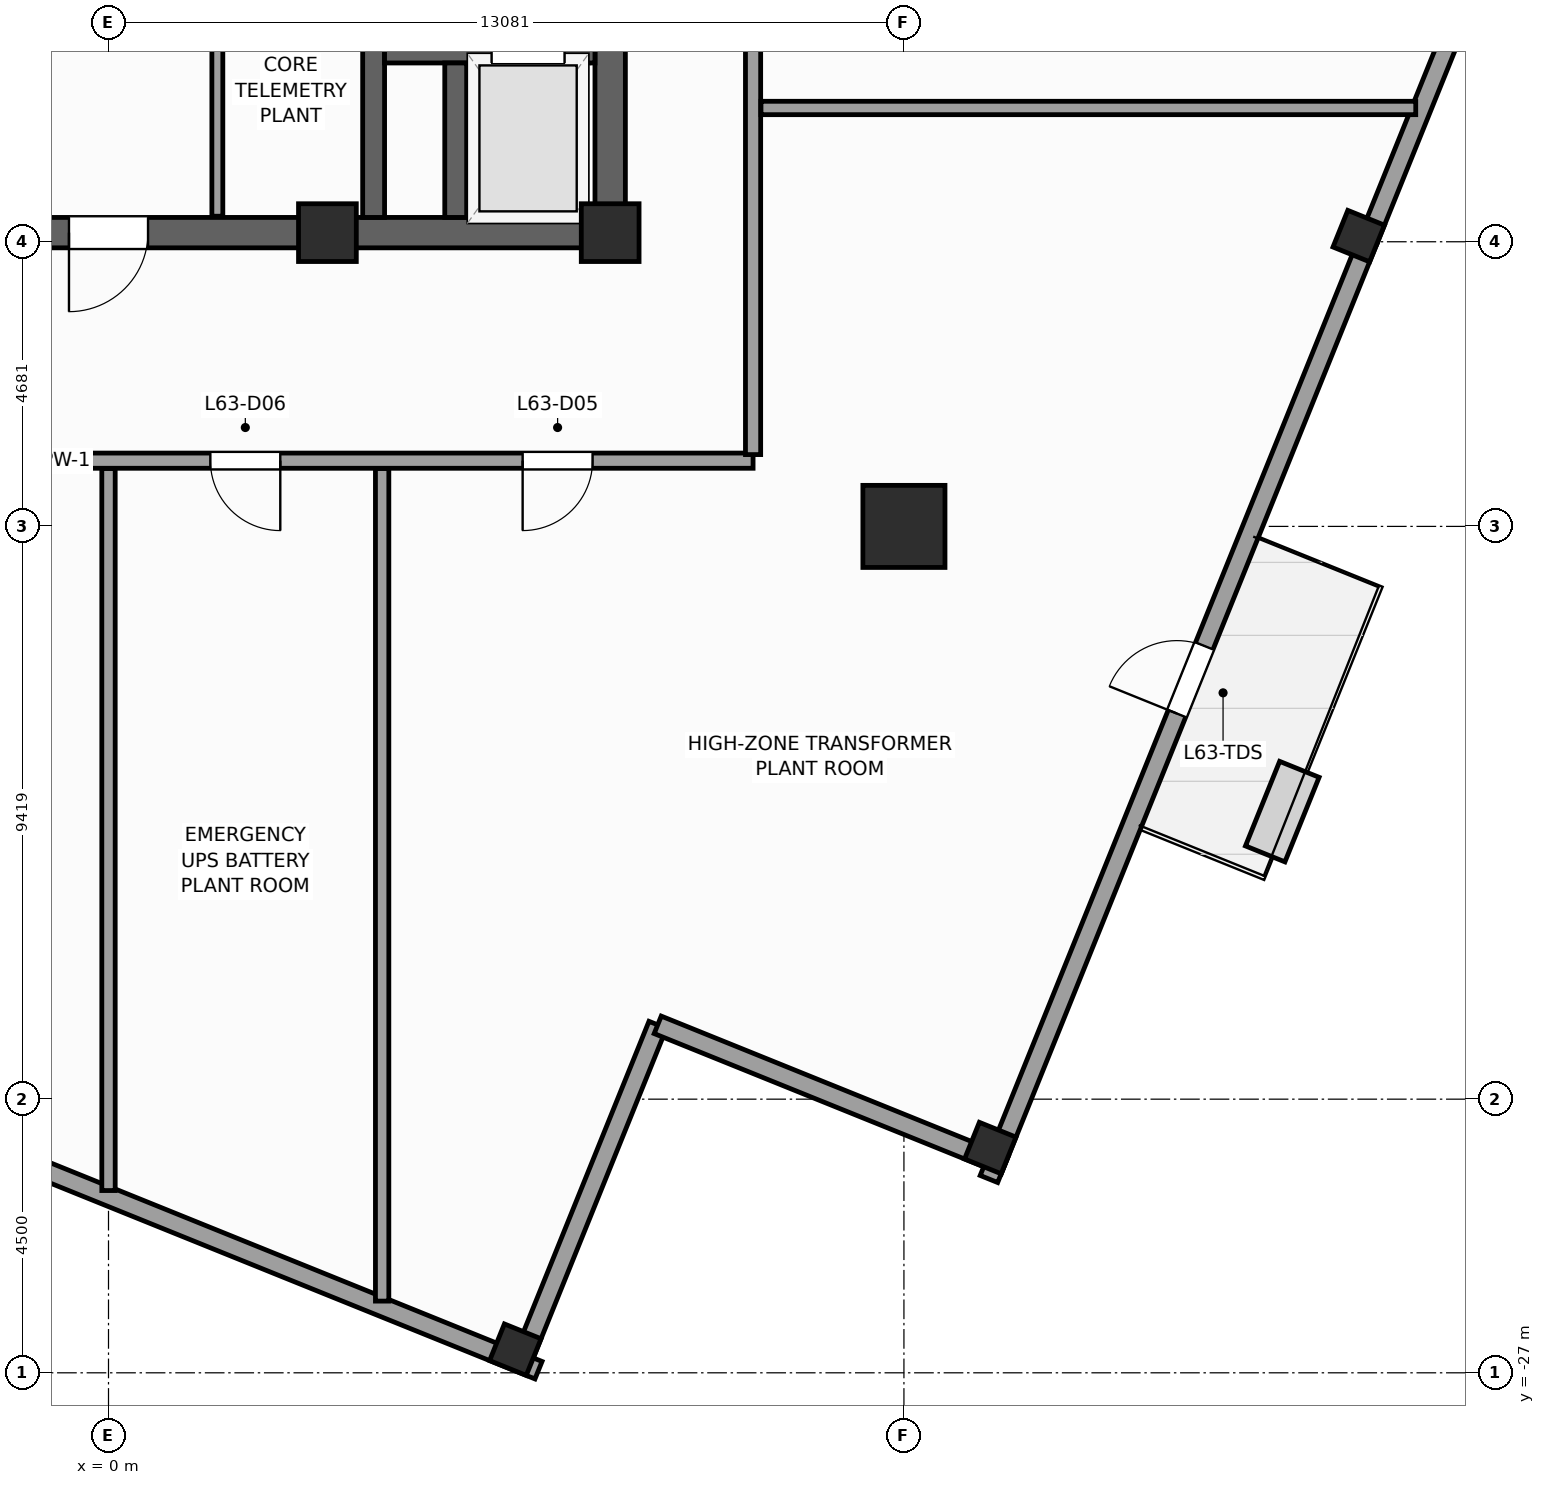
"""IFC4 building model, lengths in metres.
Left out: names, types, materials, properties, quantities, classifications, styles, units other than length and angle.
Written with IfcOpenShell. Run it as: python <this file> out.ifc"""

import sys

from ifc_helpers import new_model, si_unit, direction, frame, frame_2d, origin, origin_2d, place, context, subcontext, project, spatial, rectangle, extrude, source, transform, mapped, element, fill, save


model = new_model("IFC4")
c1 = context("Model", 3, precision=1e-05, world=origin(), true_north=direction((0.0, 1.0)))
c2 = subcontext(c1, "Body", "Model", "MODEL_VIEW")
j1 = project(units=[si_unit("LENGTHUNIT", "METRE"), si_unit("PLANEANGLEUNIT", "RADIAN")], contexts=[c1])
p1 = place(None, origin())
s1 = spatial("IfcSite", under=j1, at=p1, CompositionType="ELEMENT")
p2 = place(p1, origin())
s2 = spatial("IfcBuilding", under=s1, at=p2, CompositionType="ELEMENT")
p3 = place(p2, frame((0.0, 0.0, 260.2)))
s3 = spatial("IfcBuildingStorey", under=s2, at=p3, CompositionType="ELEMENT", Elevation=260.2)
p4 = place(p3, frame((-8.5, -8.25, 0.0), z_axis=(0.0, 0.0, 1.0), x_axis=(1.0, 0.0, 0.0)))
e1 = element("IfcWall", 1, at=p4, inside=s3, PredefinedType="SHEAR", context=c2, shape_type="SweptSolid", body=[
    extrude(rectangle(XDim=17.0, YDim=0.5, at=frame_2d((8.5, 0.0))), origin(), (0.0, 0.0, 1.0), 5.0),
])
p5 = place(p4, frame((7.85, 0.0, 0.0)))
e2 = element("IfcOpeningElement", 2, at=p5, cuts=e1, PredefinedType="OPENING", context=c2, shape_type="SweptSolid", body=[
    extrude(rectangle(XDim=1.3, YDim=2.2, at=frame_2d((0.65, 1.1))), frame((0.0, 0.26, 0.0), z_axis=(0.0, -1.0, 0.0), x_axis=(1.0, 0.0, 0.0)), (0.0, 0.0, 1.0), 0.52),
])
p6 = place(p3, frame((8.25, -8.0, 0.0), z_axis=(0.0, 0.0, 1.0), x_axis=(0.0, 1.0, 0.0)))
e3 = element("IfcWall", 3, at=p6, inside=s3, PredefinedType="SHEAR", context=c2, shape_type="SweptSolid", body=[
    extrude(rectangle(XDim=16.0, YDim=0.5, at=frame_2d((8.0, 0.0))), origin(), (0.0, 0.0, 1.0), 5.0),
])
p7 = place(p6, frame((4.69, 0.0, 0.0)))
e4 = element("IfcOpeningElement", 4, at=p7, cuts=e3, PredefinedType="OPENING", context=c2, shape_type="SweptSolid", body=[
    extrude(rectangle(XDim=1.3, YDim=2.2, at=frame_2d((0.65, 1.1))), frame((0.0, 0.26, 0.0), z_axis=(0.0, -1.0, 0.0), x_axis=(1.0, 0.0, 0.0)), (0.0, 0.0, 1.0), 0.52),
])
p8 = place(p3, frame((4.36, -8.0, 0.0), z_axis=(0.0, 0.0, 1.0), x_axis=(0.0, 1.0, 0.0)))
e5 = element("IfcWall", 5, at=p8, inside=s3, PredefinedType="SHEAR", context=c2, shape_type="SweptSolid", body=[
    extrude(rectangle(XDim=16.0, YDim=0.36, at=frame_2d((8.0, 0.0))), origin(), (0.0, 0.0, 1.0), 5.0),
])
p9 = place(p3, frame((4.54, -5.28, 0.0), z_axis=(0.0, 0.0, 1.0), x_axis=(1.0, 0.0, 0.0)))
e6 = element("IfcWall", 6, at=p9, inside=s3, PredefinedType="SHEAR", context=c2, shape_type="SweptSolid", body=[
    extrude(rectangle(XDim=3.46, YDim=0.36, at=frame_2d((1.73, 0.0))), origin(), (0.0, 0.0, 1.0), 5.0),
])
p10 = place(p9, frame((1.76, 0.0, 0.0)))
e7 = element("IfcOpeningElement", 7, at=p10, cuts=e6, PredefinedType="OPENING", context=c2, shape_type="SweptSolid", body=[
    extrude(rectangle(XDim=1.2, YDim=2.25, at=frame_2d((0.6, 1.125))), frame((0.0, 0.19, 0.0), z_axis=(0.0, -1.0, 0.0), x_axis=(1.0, 0.0, 0.0)), (0.0, 0.0, 1.0), 0.38),
])
p11 = place(p3, frame((5.71, -8.0, 0.0), z_axis=(0.0, 0.0, 1.0), x_axis=(0.0, 1.0, 0.0)))
e8 = element("IfcWall", 8, at=p11, inside=s3, PredefinedType="SHEAR", context=c2, shape_type="SweptSolid", body=[
    extrude(rectangle(XDim=2.54, YDim=0.36, at=frame_2d((1.27, 0.0))), origin(), (0.0, 0.0, 1.0), 5.0),
])
m1 = source(origin(), c2, "Body", "SweptSolid", [
    extrude(rectangle(XDim=0.95, YDim=0.95, at=origin_2d()), origin(), (0.0, 0.0, 1.0), 5.0),
])
for number, where, z_axis, x_axis in (
    (9, (8.25, -8.25, 0.0), (0.0, 0.0, 1.0), (1.0, 0.0, 0.0)),
    (10, (3.6, -8.25, 0.0), (0.0, 0.0, 1.0), (1.0, 0.0, 0.0)),
):
    element("IfcColumn", number, at=place(p3, frame(where, z_axis=z_axis, x_axis=x_axis)), inside=s3, PredefinedType="PILASTER", context=c2, shape_type="MappedRepresentation", body=[
        mapped(m1, transform((0.0, 0.0, 0.0), scale=1.0)),
    ])
m2 = source(origin(), c2, "Body", "SweptSolid", [
    extrude(rectangle(XDim=1.35, YDim=1.35, at=origin_2d()), origin(), (0.0, 0.0, 1.0), 5.0),
])
p12 = place(p3, frame((13.081, -13.081, 0.0), z_axis=(0.0, 0.0, 1.0), x_axis=(1.0, 0.0, 0.0)))
e11 = element("IfcColumn", 11, at=p12, inside=s3, PredefinedType="COLUMN", context=c2, shape_type="MappedRepresentation", body=[
    mapped(m2, transform((0.0, 0.0, 0.0), scale=1.0)),
])
m3 = source(origin(), c2, "Body", "SweptSolid", [
    extrude(rectangle(XDim=0.65, YDim=0.65, at=origin_2d()), origin(), (0.0, 0.0, 1.0), 5.0),
])
for number, where, z_axis, x_axis in (
    (12, (14.501, -23.304, 0.0), (0.0, 0.0, 1.0), (0.375, 0.927, 0.0)),
    (13, (20.56, -8.307, 0.0), (0.0, 0.0, 1.0), (0.375, 0.927, 0.0)),
    (14, (6.69, -26.62, 0.0), (0.0, 0.0, 1.0), (0.375, 0.927, 0.0)),
):
    element("IfcColumn", number, at=place(p3, frame(where, z_axis=z_axis, x_axis=x_axis)), inside=s3, PredefinedType="COLUMN", context=c2, shape_type="MappedRepresentation", body=[
        mapped(m3, transform((0.0, 0.0, 0.0), scale=1.0)),
    ])
p13 = place(p3, frame((6.784, -26.841, 0.0), z_axis=(0.0, 0.0, 1.0), x_axis=(0.374636620962, 0.927171722085, 0.0)))
e15 = element("IfcWall", 15, at=p13, inside=s3, PredefinedType="STANDARD", context=c2, shape_type="SweptSolid", body=[
    extrude(rectangle(XDim=6.0, YDim=0.31, at=frame_2d((3.0, 0.0))), origin(), (0.0, 0.0, 1.0), 4.05),
])
p14 = place(p3, frame((9.032, -21.278, 0.0), z_axis=(0.0, 0.0, 1.0), x_axis=(0.927185411764, -0.374602739196, 0.0)))
e16 = element("IfcWall", 16, at=p14, inside=s3, PredefinedType="STANDARD", context=c2, shape_type="SweptSolid", body=[
    extrude(rectangle(XDim=6.155, YDim=0.31, at=frame_2d((3.078, 0.0))), origin(), (0.0, 0.0, 1.0), 4.75),
])
p15 = place(p3, frame((14.479, -23.813, 0.0), z_axis=(0.0, 0.0, 1.0), x_axis=(0.374618403537, 0.927179082881, 0.0)))
e17 = element("IfcWall", 17, at=p15, inside=s3, PredefinedType="STANDARD", context=c2, shape_type="SweptSolid", body=[
    extrude(rectangle(XDim=16.655, YDim=0.31, at=frame_2d((8.328, 0.0))), origin(), (0.0, 0.0, 1.0), 4.15),
])
p16 = place(p15, frame((8.255, 0.0, 0.0)))
e18 = element("IfcOpeningElement", 18, at=p16, cuts=e17, PredefinedType="OPENING", context=c2, shape_type="SweptSolid", body=[
    extrude(rectangle(XDim=1.2, YDim=2.3, at=frame_2d((0.6, 1.15))), frame((0.0, 0.165, 0.0), z_axis=(0.0, -1.0, 0.0), x_axis=(1.0, 0.0, 0.0)), (0.0, 0.0, 1.0), 0.33),
])
p17 = place(p3, frame((20.718, -8.371, 0.0), z_axis=(0.0, 0.0, 1.0), x_axis=(0.374600710538, 0.927186231382, 0.0)))
e19 = element("IfcWall", 19, at=p17, inside=s3, PredefinedType="STANDARD", context=c2, shape_type="SweptSolid", body=[
    extrude(rectangle(XDim=16.655, YDim=0.31, at=frame_2d((8.328, 0.0))), origin(), (0.0, 0.0, 1.0), 4.15),
])
p18 = place(p17, frame((6.495, 0.0, 0.65)))
e20 = element("IfcOpeningElement", 20, at=p18, cuts=e19, PredefinedType="OPENING", context=c2, shape_type="SweptSolid", body=[
    extrude(rectangle(XDim=2.0, YDim=1.45, at=frame_2d((1.0, 0.725))), frame((0.0, 0.165, 0.0), z_axis=(0.0, -1.0, 0.0), x_axis=(1.0, 0.0, 0.0)), (0.0, 0.0, 1.0), 0.33),
])
p19 = place(p3, frame((-9.298, -20.343, 0.0), z_axis=(0.0, 0.0, 1.0), x_axis=(0.927183654967, -0.374607087443, 0.0)))
e21 = element("IfcWall", 21, at=p19, inside=s3, PredefinedType="STANDARD", context=c2, shape_type="SweptSolid", body=[
    extrude(rectangle(XDim=17.655, YDim=0.31, at=frame_2d((8.828, 0.0))), origin(), (0.0, 0.0, 1.0), 4.15),
])
p20 = place(p19, frame((6.945, 0.0, 0.65)))
e22 = element("IfcOpeningElement", 22, at=p20, cuts=e21, PredefinedType="OPENING", context=c2, shape_type="SweptSolid", body=[
    extrude(rectangle(XDim=2.0, YDim=1.45, at=frame_2d((1.0, 0.725))), frame((0.0, 0.165, 0.0), z_axis=(0.0, -1.0, 0.0), x_axis=(1.0, 0.0, 0.0)), (0.0, 0.0, 1.0), 0.33),
])
p21 = place(p3, frame((1.79, -7.98, 0.0), z_axis=(0.0, 0.0, 1.0), x_axis=(0.0, 1.0, 0.0)))
e23 = element("IfcWall", 23, at=p21, inside=s3, PredefinedType="PARTITIONING", context=c2, shape_type="SweptSolid", body=[
    extrude(rectangle(XDim=12.38, YDim=0.18, at=frame_2d((6.19, 0.0))), origin(), (0.0, 0.0, 1.0), 4.75),
])
p22 = place(p21, frame((8.8, 0.0, 0.0)))
e24 = element("IfcOpeningElement", 24, at=p22, cuts=e23, PredefinedType="OPENING", context=c2, shape_type="SweptSolid", body=[
    extrude(rectangle(XDim=1.1, YDim=2.2, at=frame_2d((0.55, 1.1))), frame((0.0, 0.1, 0.0), z_axis=(0.0, -1.0, 0.0), x_axis=(1.0, 0.0, 0.0)), (0.0, 0.0, 1.0), 0.2),
])
p23 = place(p21, frame((10.86, 0.0, 0.0)))
e25 = element("IfcOpeningElement", 25, at=p23, cuts=e23, PredefinedType="OPENING", context=c2, shape_type="SweptSolid", body=[
    extrude(rectangle(XDim=1.1, YDim=2.2, at=frame_2d((0.55, 1.1))), frame((0.0, 0.1, 0.0), z_axis=(0.0, -1.0, 0.0), x_axis=(1.0, 0.0, 0.0)), (0.0, 0.0, 1.0), 0.2),
])
p24 = place(p21, frame((3.5, 0.0, 0.0)))
e26 = element("IfcOpeningElement", 26, at=p24, cuts=e23, PredefinedType="OPENING", context=c2, shape_type="SweptSolid", body=[
    extrude(rectangle(XDim=1.15, YDim=2.25, at=frame_2d((0.575, 1.125))), frame((0.0, 0.1, 0.0), z_axis=(0.0, -1.0, 0.0), x_axis=(1.0, 0.0, 0.0)), (0.0, 0.0, 1.0), 0.2),
])
p25 = place(p3, frame((-12.0, -12.0, 0.0), z_axis=(0.0, 0.0, 1.0), x_axis=(1.0, 0.0, 0.0)))
e27 = element("IfcWall", 27, at=p25, inside=s3, PredefinedType="PARTITIONING", context=c2, shape_type="SweptSolid", body=[
    extrude(rectangle(XDim=22.6, YDim=0.25, at=frame_2d((11.3, 0.0))), origin(), (0.0, 0.0, 1.0), 4.75),
])
p26 = place(p25, frame((18.811, 0.0, 0.0)))
e28 = element("IfcOpeningElement", 28, at=p26, cuts=e27, PredefinedType="OPENING", context=c2, shape_type="SweptSolid", body=[
    extrude(rectangle(XDim=1.15, YDim=2.25, at=frame_2d((0.575, 1.125))), frame((0.0, 0.135, 0.0), z_axis=(0.0, -1.0, 0.0), x_axis=(1.0, 0.0, 0.0)), (0.0, 0.0, 1.0), 0.27),
])
p27 = place(p25, frame((13.675, 0.0, 0.0)))
e29 = element("IfcOpeningElement", 29, at=p27, cuts=e27, PredefinedType="OPENING", context=c2, shape_type="SweptSolid", body=[
    extrude(rectangle(XDim=1.15, YDim=2.25, at=frame_2d((0.575, 1.125))), frame((0.0, 0.135, 0.0), z_axis=(0.0, -1.0, 0.0), x_axis=(1.0, 0.0, 0.0)), (0.0, 0.0, 1.0), 0.27),
])
p28 = place(p25, frame((8.925, 0.0, 0.0)))
e30 = element("IfcOpeningElement", 30, at=p28, cuts=e27, PredefinedType="OPENING", context=c2, shape_type="SweptSolid", body=[
    extrude(rectangle(XDim=1.15, YDim=2.25, at=frame_2d((0.575, 1.125))), frame((0.0, 0.135, 0.0), z_axis=(0.0, -1.0, 0.0), x_axis=(1.0, 0.0, 0.0)), (0.0, 0.0, 1.0), 0.27),
])
p29 = place(p25, frame((3.089, 0.0, 0.0)))
e31 = element("IfcOpeningElement", 31, at=p29, cuts=e27, PredefinedType="OPENING", context=c2, shape_type="SweptSolid", body=[
    extrude(rectangle(XDim=1.15, YDim=2.25, at=frame_2d((0.575, 1.125))), frame((0.0, 0.135, 0.0), z_axis=(0.0, -1.0, 0.0), x_axis=(1.0, 0.0, 0.0)), (0.0, 0.0, 1.0), 0.27),
])
p30 = place(p3, frame((10.6, -11.9, 0.0), z_axis=(0.0, 0.0, 1.0), x_axis=(0.0, 1.0, 0.0)))
e32 = element("IfcWall", 32, at=p30, inside=s3, PredefinedType="PARTITIONING", context=c2, shape_type="SweptSolid", body=[
    extrude(rectangle(XDim=23.8, YDim=0.25, at=frame_2d((11.9, 0.0))), origin(), (0.0, 0.0, 1.0), 4.75),
])
p31 = place(p30, frame((20.21, 0.0, 0.0)))
e33 = element("IfcOpeningElement", 33, at=p31, cuts=e32, PredefinedType="OPENING", context=c2, shape_type="SweptSolid", body=[
    extrude(rectangle(XDim=1.15, YDim=2.25, at=frame_2d((0.575, 1.125))), frame((0.0, 0.135, 0.0), z_axis=(0.0, -1.0, 0.0), x_axis=(1.0, 0.0, 0.0)), (0.0, 0.0, 1.0), 0.27),
])
p32 = place(p30, frame((11.325, 0.0, 0.0)))
e34 = element("IfcOpeningElement", 34, at=p32, cuts=e32, PredefinedType="OPENING", context=c2, shape_type="SweptSolid", body=[
    extrude(rectangle(XDim=1.15, YDim=2.25, at=frame_2d((0.575, 1.125))), frame((0.0, 0.135, 0.0), z_axis=(0.0, -1.0, 0.0), x_axis=(1.0, 0.0, 0.0)), (0.0, 0.0, 1.0), 0.27),
])
p33 = place(p3, frame((10.73, -6.2, 0.0), z_axis=(0.0, 0.0, 1.0), x_axis=(1.0, 0.0, 0.0)))
e35 = element("IfcWall", 35, at=p33, inside=s3, PredefinedType="PARTITIONING", context=c2, shape_type="SweptSolid", body=[
    extrude(rectangle(XDim=10.768, YDim=0.22, at=frame_2d((5.384, 0.0))), origin(), (0.0, 0.0, 1.0), 4.75),
])
p34 = place(p3, frame((4.5, -12.13, 0.0), z_axis=(0.0, 0.0, 1.0), x_axis=(0.0, -1.0, 0.0)))
e36 = element("IfcWall", 36, at=p34, inside=s3, PredefinedType="PARTITIONING", context=c2, shape_type="SweptSolid", body=[
    extrude(rectangle(XDim=13.691, YDim=0.22, at=frame_2d((6.845, 0.0))), origin(), (0.0, 0.0, 1.0), 4.75),
])
p35 = place(p3, frame((0.0, -12.13, 0.0), z_axis=(0.0, 0.0, 1.0), x_axis=(0.0, -1.0, 0.0)))
e37 = element("IfcWall", 37, at=p35, inside=s3, PredefinedType="PARTITIONING", context=c2, shape_type="SweptSolid", body=[
    extrude(rectangle(XDim=11.873, YDim=0.22, at=frame_2d((5.937, 0.0))), origin(), (0.0, 0.0, 1.0), 4.42),
])
m4 = source(origin(), c2, "Body", "SweptSolid", [
    extrude(rectangle(XDim=1.2, YDim=2.3, at=frame_2d((0.6, 1.15))), frame((0.0, 0.025, 0.0), z_axis=(0.0, -1.0, 0.0), x_axis=(1.0, 0.0, 0.0)), (0.0, 0.0, 1.0), 0.05),
])
p36 = place(p16, origin())
e38 = element("IfcDoor", 38, at=p36, inside=s3, OperationType="SINGLE_SWING_LEFT", PredefinedType="DOOR", context=c2, shape_type="MappedRepresentation", body=[
    mapped(m4, transform((0.0, 0.0, 0.0), scale=1.0)),
])
fill(e18, e38)
m5 = source(origin(), c2, "Body", "SweptSolid", [
    extrude(rectangle(XDim=1.3, YDim=2.2, at=frame_2d((0.65, 1.1))), frame((0.0, 0.025, 0.0), z_axis=(0.0, -1.0, 0.0), x_axis=(1.0, 0.0, 0.0)), (0.0, 0.0, 1.0), 0.05),
])
p37 = place(p5, frame((1.3, 0.0, 0.0), z_axis=(0.0, 0.0, 1.0), x_axis=(-1.0, 0.0, 0.0)))
e39 = element("IfcDoor", 39, at=p37, inside=s3, OperationType="SINGLE_SWING_LEFT", PredefinedType="DOOR", context=c2, shape_type="MappedRepresentation", body=[
    mapped(m5, transform((0.0, 0.0, 0.0), scale=1.0)),
])
fill(e2, e39)
m6 = source(origin(), c2, "Body", "SweptSolid", [
    extrude(rectangle(XDim=1.2, YDim=2.25, at=frame_2d((0.6, 1.125))), frame((0.0, 0.025, 0.0), z_axis=(0.0, -1.0, 0.0), x_axis=(1.0, 0.0, 0.0)), (0.0, 0.0, 1.0), 0.05),
])
p38 = place(p10, origin())
e40 = element("IfcDoor", 40, at=p38, inside=s3, OperationType="DOUBLE_DOOR_SLIDING", PredefinedType="DOOR", context=c2, shape_type="MappedRepresentation", body=[
    mapped(m6, transform((0.0, 0.0, 0.0), scale=1.0)),
])
fill(e7, e40)
m7 = source(origin(), c2, "Body", "SweptSolid", [
    extrude(rectangle(XDim=1.15, YDim=2.25, at=frame_2d((0.575, 1.125))), frame((0.0, 0.025, 0.0), z_axis=(0.0, -1.0, 0.0), x_axis=(1.0, 0.0, 0.0)), (0.0, 0.0, 1.0), 0.05),
])
p39 = place(p26, frame((1.15, 0.0, 0.0), z_axis=(0.0, 0.0, 1.0), x_axis=(-1.0, 0.0, 0.0)))
e41 = element("IfcDoor", 41, at=p39, inside=s3, OperationType="SINGLE_SWING_LEFT", PredefinedType="DOOR", context=c2, shape_type="MappedRepresentation", body=[
    mapped(m7, transform((0.0, 0.0, 0.0), scale=1.0)),
])
fill(e28, e41)
p40 = place(p27, frame((1.15, 0.0, 0.0), z_axis=(0.0, 0.0, 1.0), x_axis=(-1.0, 0.0, 0.0)))
e42 = element("IfcDoor", 42, at=p40, inside=s3, OperationType="SINGLE_SWING_RIGHT", PredefinedType="DOOR", context=c2, shape_type="MappedRepresentation", body=[
    mapped(m7, transform((0.0, 0.0, 0.0), scale=1.0)),
])
fill(e29, e42)
save(model, sys.argv[1])
